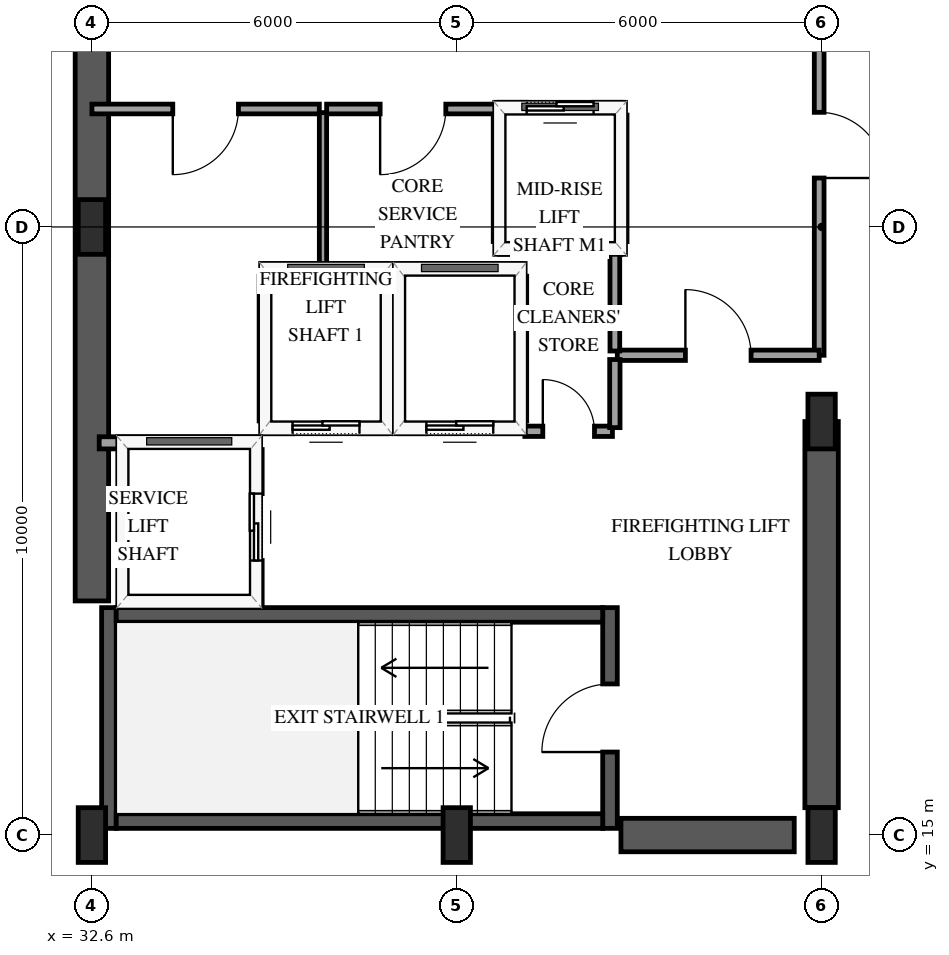
"""IFC4 building model, lengths in metres.
Left out: names, types, materials, properties, quantities, classifications, styles, units other than length and angle.
Written with IfcOpenShell. Run it as: python <this file> out.ifc"""

import sys

from ifc_helpers import new_model, si_unit, direction, frame, frame_2d, origin, origin_2d, place, context, subcontext, project, spatial, rectangle, extrude, element, fill, save


model = new_model("IFC4")
c1 = context("Model", 3, precision=1e-05, world=origin(), true_north=direction((0.0, 1.0)))
c2 = subcontext(c1, "Body", "Model", "MODEL_VIEW")
j1 = project(units=[si_unit("LENGTHUNIT", "METRE"), si_unit("PLANEANGLEUNIT", "RADIAN")], contexts=[c1])
p1 = place(None, origin())
s1 = spatial("IfcSite", under=j1, at=p1, CompositionType="ELEMENT")
p2 = place(p1, origin())
s2 = spatial("IfcBuilding", under=s1, at=p2, CompositionType="ELEMENT")
p3 = place(p2, frame((0.0, 0.0, 171.4)))
s3 = spatial("IfcBuildingStorey", under=s2, at=p3, CompositionType="ELEMENT", Elevation=171.4)
p4 = place(p3, frame((32.88, 15.11, 0.0), z_axis=(0.0, 0.0, 1.0), x_axis=(0.0, 1.0, 0.0)))
e1 = element("IfcWall", 1, at=p4, inside=s3, PredefinedType="SHEAR", context=c2, shape_type="SweptSolid", body=[
    extrude(rectangle(XDim=3.63, YDim=0.24, at=frame_2d((1.815, 0.0))), origin(), (0.0, 0.0, 1.0), 3.6),
])
p5 = place(p3, frame((41.12, 15.11, 0.0), z_axis=(0.0, 0.0, 1.0), x_axis=(0.0, 1.0, 0.0)))
e2 = element("IfcWall", 2, at=p5, inside=s3, PredefinedType="SHEAR", context=c2, shape_type="SweptSolid", body=[
    extrude(rectangle(XDim=3.63, YDim=0.24, at=frame_2d((1.815, 0.0))), origin(), (0.0, 0.0, 1.0), 3.6),
])
p6 = place(p5, frame((1.255, 0.0, 0.0)))
e3 = element("IfcOpeningElement", 3, at=p6, cuts=e2, PredefinedType="OPENING", context=c2, shape_type="SweptSolid", body=[
    extrude(rectangle(XDim=1.12, YDim=2.15, at=frame_2d((0.56, 1.075))), frame((0.0, 0.13, 0.0), z_axis=(0.0, -1.0, 0.0), x_axis=(1.0, 0.0, 0.0)), (0.0, 0.0, 1.0), 0.26),
])
for number, where, z_axis, x_axis in (
    (4, (33.0, 15.23, 0.0), (0.0, 0.0, 1.0), (1.0, 0.0, 0.0)),
    (5, (33.0, 18.62, 0.0), (0.0, 0.0, 1.0), (1.0, 0.0, 0.0)),
):
    element("IfcWall", number, at=place(p3, frame(where, z_axis=z_axis, x_axis=x_axis)), inside=s3, PredefinedType="SHEAR", context=c2, shape_type="SweptSolid", body=[
        extrude(rectangle(XDim=8.0, YDim=0.24, at=frame_2d((4.0, 0.0))), origin(), (0.0, 0.0, 1.0), 3.6),
    ])
p7 = place(p3, frame((32.6, 18.85, 0.0), z_axis=(0.0, 0.0, 1.0), x_axis=(0.0, 1.0, 0.0)))
e6 = element("IfcWall", 6, at=p7, inside=s3, PredefinedType="SHEAR", context=c2, shape_type="SweptSolid", body=[
    extrude(rectangle(XDim=12.3, YDim=0.55, at=frame_2d((6.15, 0.0))), origin(), (0.0, 0.0, 1.0), 3.6),
])
p8 = place(p3, frame((41.3, 15.0, 0.0), z_axis=(0.0, 0.0, 1.0), x_axis=(1.0, 0.0, 0.0)))
e7 = element("IfcWall", 7, at=p8, inside=s3, PredefinedType="SHEAR", context=c2, shape_type="SweptSolid", body=[
    extrude(rectangle(XDim=2.85, YDim=0.55, at=frame_2d((1.425, 0.0))), origin(), (0.0, 0.0, 1.0), 3.6),
])
p9 = place(p3, frame((44.6, 15.45, 0.0), z_axis=(0.0, 0.0, 1.0), x_axis=(0.0, 1.0, 0.0)))
e8 = element("IfcWall", 8, at=p9, inside=s3, PredefinedType="SHEAR", context=c2, shape_type="SweptSolid", body=[
    extrude(rectangle(XDim=6.35, YDim=0.55, at=frame_2d((3.175, 0.0))), origin(), (0.0, 0.0, 1.0), 3.6),
])
for number, where, z_axis, x_axis in (
    (9, (32.6, 15.0, 0.0), (0.0, 0.0, 1.0), (1.0, 0.0, 0.0)),
    (10, (32.6, 25.0, 0.0), (0.0, 0.0, 1.0), (1.0, 0.0, 0.0)),
    (11, (38.6, 15.0, 0.0), (0.0, 0.0, 1.0), (1.0, 0.0, 0.0)),
    (12, (44.6, 15.0, 0.0), (0.0, 0.0, 1.0), (1.0, 0.0, 0.0)),
    (13, (44.6, 21.8, 0.0), (0.0, 0.0, 1.0), (1.0, 0.0, 0.0)),
):
    element("IfcColumn", number, at=place(p3, frame(where, z_axis=z_axis, x_axis=x_axis)), inside=s3, PredefinedType="PILASTER", context=c2, shape_type="SweptSolid", body=[
        extrude(rectangle(XDim=0.45, YDim=0.9, at=origin_2d()), origin(), (0.0, 0.0, 1.0), 3.6),
    ])
p10 = place(p3, frame((35.45, 21.7, 0.0), z_axis=(0.0, 0.0, 1.0), x_axis=(1.0, 0.0, 0.0)))
e14 = element("IfcWall", 14, at=p10, inside=s3, PredefinedType="SOLIDWALL", context=c2, shape_type="SweptSolid", body=[
    extrude(rectangle(XDim=2.0, YDim=0.2, at=frame_2d((1.0, 0.0))), origin(), (0.0, 0.0, 1.0), 3.3),
])
p11 = place(p10, frame((0.45, 0.0, 0.0)))
e15 = element("IfcOpeningElement", 15, at=p11, cuts=e14, PredefinedType="OPENING", context=c2, shape_type="SweptSolid", body=[
    extrude(rectangle(XDim=1.1, YDim=2.15, at=frame_2d((0.55, 1.075))), frame((0.0, 0.11, 0.0), z_axis=(0.0, -1.0, 0.0), x_axis=(1.0, 0.0, 0.0)), (0.0, 0.0, 1.0), 0.22),
])
p12 = place(p3, frame((35.45, 24.3, 0.0), z_axis=(0.0, 0.0, 1.0), x_axis=(1.0, 0.0, 0.0)))
e16 = element("IfcWall", 16, at=p12, inside=s3, PredefinedType="SOLIDWALL", context=c2, shape_type="SweptSolid", body=[
    extrude(rectangle(XDim=2.0, YDim=0.2, at=frame_2d((1.0, 0.0))), origin(), (0.0, 0.0, 1.0), 3.3),
])
for number, where, z_axis, x_axis in (
    (17, (35.45, 21.81, 0.0), (0.0, 0.0, 1.0), (0.0, 1.0, 0.0)),
    (18, (37.45, 21.81, 0.0), (0.0, 0.0, 1.0), (0.0, 1.0, 0.0)),
):
    element("IfcWall", number, at=place(p3, frame(where, z_axis=z_axis, x_axis=x_axis)), inside=s3, PredefinedType="SOLIDWALL", context=c2, shape_type="SweptSolid", body=[
        extrude(rectangle(XDim=2.38, YDim=0.2, at=frame_2d((1.19, 0.0))), origin(), (0.0, 0.0, 1.0), 3.3),
    ])
p13 = place(p3, frame((37.65, 21.7, 0.0), z_axis=(0.0, 0.0, 1.0), x_axis=(1.0, 0.0, 0.0)))
e19 = element("IfcWall", 19, at=p13, inside=s3, PredefinedType="SOLIDWALL", context=c2, shape_type="SweptSolid", body=[
    extrude(rectangle(XDim=2.0, YDim=0.2, at=frame_2d((1.0, 0.0))), origin(), (0.0, 0.0, 1.0), 3.3),
])
p14 = place(p13, frame((0.45, 0.0, 0.0)))
e20 = element("IfcOpeningElement", 20, at=p14, cuts=e19, PredefinedType="OPENING", context=c2, shape_type="SweptSolid", body=[
    extrude(rectangle(XDim=1.1, YDim=2.15, at=frame_2d((0.55, 1.075))), frame((0.0, 0.11, 0.0), z_axis=(0.0, -1.0, 0.0), x_axis=(1.0, 0.0, 0.0)), (0.0, 0.0, 1.0), 0.22),
])
p15 = place(p3, frame((37.65, 24.3, 0.0), z_axis=(0.0, 0.0, 1.0), x_axis=(1.0, 0.0, 0.0)))
e21 = element("IfcWall", 21, at=p15, inside=s3, PredefinedType="SOLIDWALL", context=c2, shape_type="SweptSolid", body=[
    extrude(rectangle(XDim=2.0, YDim=0.2, at=frame_2d((1.0, 0.0))), origin(), (0.0, 0.0, 1.0), 3.3),
])
p16 = place(p3, frame((39.65, 21.81, 0.0), z_axis=(0.0, 0.0, 1.0), x_axis=(0.0, 1.0, 0.0)))
e22 = element("IfcWall", 22, at=p16, inside=s3, PredefinedType="SOLIDWALL", context=c2, shape_type="SweptSolid", body=[
    extrude(rectangle(XDim=2.38, YDim=0.2, at=frame_2d((1.19, 0.0))), origin(), (0.0, 0.0, 1.0), 3.3),
])
p17 = place(p3, frame((32.72, 21.45, 0.0), z_axis=(0.0, 0.0, 1.0), x_axis=(1.0, 0.0, 0.0)))
e23 = element("IfcWall", 23, at=p17, inside=s3, PredefinedType="SOLIDWALL", context=c2, shape_type="SweptSolid", body=[
    extrude(rectangle(XDim=2.58, YDim=0.2, at=frame_2d((1.29, 0.0))), origin(), (0.0, 0.0, 1.0), 3.3),
])
p18 = place(p3, frame((35.3, 18.79, 0.0), z_axis=(0.0, 0.0, 1.0), x_axis=(0.0, 1.0, 0.0)))
e24 = element("IfcWall", 24, at=p18, inside=s3, PredefinedType="SOLIDWALL", context=c2, shape_type="SweptSolid", body=[
    extrude(rectangle(XDim=2.55, YDim=0.2, at=frame_2d((1.275, 0.0))), origin(), (0.0, 0.0, 1.0), 3.3),
])
p19 = place(p18, frame((0.725, 0.0, 0.0)))
e25 = element("IfcOpeningElement", 25, at=p19, cuts=e24, PredefinedType="OPENING", context=c2, shape_type="SweptSolid", body=[
    extrude(rectangle(XDim=1.1, YDim=2.15, at=frame_2d((0.55, 1.075))), frame((0.0, 0.11, 0.0), z_axis=(0.0, -1.0, 0.0), x_axis=(1.0, 0.0, 0.0)), (0.0, 0.0, 1.0), 0.22),
])
p20 = place(p3, frame((39.3, 24.65, 0.0), z_axis=(0.0, 0.0, 1.0), x_axis=(1.0, 0.0, 0.0)))
e26 = element("IfcWall", 26, at=p20, inside=s3, PredefinedType="SOLIDWALL", context=c2, shape_type="SweptSolid", body=[
    extrude(rectangle(XDim=2.0, YDim=0.2, at=frame_2d((1.0, 0.0))), origin(), (0.0, 0.0, 1.0), 3.3),
])
p21 = place(p3, frame((39.3, 26.95, 0.0), z_axis=(0.0, 0.0, 1.0), x_axis=(1.0, 0.0, 0.0)))
e27 = element("IfcWall", 27, at=p21, inside=s3, PredefinedType="SOLIDWALL", context=c2, shape_type="SweptSolid", body=[
    extrude(rectangle(XDim=2.0, YDim=0.2, at=frame_2d((1.0, 0.0))), origin(), (0.0, 0.0, 1.0), 3.3),
])
p22 = place(p21, frame((0.45, 0.0, 0.0)))
e28 = element("IfcOpeningElement", 28, at=p22, cuts=e27, PredefinedType="OPENING", context=c2, shape_type="SweptSolid", body=[
    extrude(rectangle(XDim=1.1, YDim=2.15, at=frame_2d((0.55, 1.075))), frame((0.0, 0.11, 0.0), z_axis=(0.0, -1.0, 0.0), x_axis=(1.0, 0.0, 0.0)), (0.0, 0.0, 1.0), 0.22),
])
for number, where, z_axis, x_axis in (
    (29, (39.3, 24.76, 0.0), (0.0, 0.0, 1.0), (0.0, 1.0, 0.0)),
    (30, (41.3, 24.76, 0.0), (0.0, 0.0, 1.0), (0.0, 1.0, 0.0)),
):
    element("IfcWall", number, at=place(p3, frame(where, z_axis=z_axis, x_axis=x_axis)), inside=s3, PredefinedType="SOLIDWALL", context=c2, shape_type="SweptSolid", body=[
        extrude(rectangle(XDim=2.08, YDim=0.2, at=frame_2d((1.04, 0.0))), origin(), (0.0, 0.0, 1.0), 3.3),
    ])
p23 = place(p3, frame((44.56, 29.8, 0.0), z_axis=(0.0, 0.0, 1.0), x_axis=(0.0, -1.0, 0.0)))
e31 = element("IfcWall", 31, at=p23, inside=s3, PredefinedType="PARTITIONING", context=c2, shape_type="SweptSolid", body=[
    extrude(rectangle(XDim=6.91, YDim=0.16, at=frame_2d((3.455, 0.0))), origin(), (0.0, 0.0, 1.0), 2.34),
])
p24 = place(p23, frame((2.915, 0.0, 0.0)))
e32 = element("IfcOpeningElement", 32, at=p24, cuts=e31, PredefinedType="OPENING", context=c2, shape_type="SweptSolid", body=[
    extrude(rectangle(XDim=1.08, YDim=2.15, at=frame_2d((0.54, 1.075))), frame((0.0, 0.09, 0.0), z_axis=(0.0, -1.0, 0.0), x_axis=(1.0, 0.0, 0.0)), (0.0, 0.0, 1.0), 0.18),
])
p25 = place(p3, frame((36.34, 26.94, 0.0), z_axis=(0.0, 0.0, 1.0), x_axis=(-1.0, 0.0, 0.0)))
e33 = element("IfcWall", 33, at=p25, inside=s3, PredefinedType="PARTITIONING", context=c2, shape_type="SweptSolid", body=[
    extrude(rectangle(XDim=3.74, YDim=0.16, at=frame_2d((1.87, 0.0))), origin(), (0.0, 0.0, 1.0), 3.3),
])
p26 = place(p25, frame((1.33, 0.0, 0.0)))
e34 = element("IfcOpeningElement", 34, at=p26, cuts=e33, PredefinedType="OPENING", context=c2, shape_type="SweptSolid", body=[
    extrude(rectangle(XDim=1.08, YDim=2.15, at=frame_2d((0.54, 1.075))), frame((0.0, 0.09, 0.0), z_axis=(0.0, -1.0, 0.0), x_axis=(1.0, 0.0, 0.0)), (0.0, 0.0, 1.0), 0.18),
])
p27 = place(p3, frame((41.24, 22.89, 0.0), z_axis=(0.0, 0.0, 1.0), x_axis=(1.0, 0.0, 0.0)))
e35 = element("IfcWall", 35, at=p27, inside=s3, PredefinedType="PARTITIONING", context=c2, shape_type="SweptSolid", body=[
    extrude(rectangle(XDim=3.32, YDim=0.17, at=frame_2d((1.66, 0.0))), origin(), (0.0, 0.0, 1.0), 3.3),
])
p28 = place(p27, frame((1.12, 0.0, 0.0)))
e36 = element("IfcOpeningElement", 36, at=p28, cuts=e35, PredefinedType="OPENING", context=c2, shape_type="SweptSolid", body=[
    extrude(rectangle(XDim=1.08, YDim=2.15, at=frame_2d((0.54, 1.075))), frame((0.0, 0.095, 0.0), z_axis=(0.0, -1.0, 0.0), x_axis=(1.0, 0.0, 0.0)), (0.0, 0.0, 1.0), 0.19),
])
p29 = place(p3, frame((39.3, 26.94, 0.0), z_axis=(0.0, 0.0, 1.0), x_axis=(-1.0, 0.0, 0.0)))
e37 = element("IfcWall", 37, at=p29, inside=s3, PredefinedType="PARTITIONING", context=c2, shape_type="SweptSolid", body=[
    extrude(rectangle(XDim=2.84, YDim=0.16, at=frame_2d((1.42, 0.0))), origin(), (0.0, 0.0, 1.0), 3.3),
])
p30 = place(p29, frame((0.88, 0.0, 0.0)))
e38 = element("IfcOpeningElement", 38, at=p30, cuts=e37, PredefinedType="OPENING", context=c2, shape_type="SweptSolid", body=[
    extrude(rectangle(XDim=1.08, YDim=2.15, at=frame_2d((0.54, 1.075))), frame((0.0, 0.09, 0.0), z_axis=(0.0, -1.0, 0.0), x_axis=(1.0, 0.0, 0.0)), (0.0, 0.0, 1.0), 0.18),
])
p31 = place(p3, frame((36.4, 26.88, 0.0), z_axis=(0.0, 0.0, 1.0), x_axis=(0.0, -1.0, 0.0)))
e39 = element("IfcWall", 39, at=p31, inside=s3, PredefinedType="PARTITIONING", context=c2, shape_type="SweptSolid", body=[
    extrude(rectangle(XDim=2.58, YDim=0.12, at=frame_2d((1.29, 0.0))), origin(), (0.0, 0.0, 1.0), 3.3),
])
p32 = place(p3, frame((41.2, 22.96, 0.0), z_axis=(0.0, 0.0, 1.0), x_axis=(0.0, 1.0, 0.0)))
e40 = element("IfcWall", 40, at=p32, inside=s3, PredefinedType="PARTITIONING", context=c2, shape_type="SweptSolid", body=[
    extrude(rectangle(XDim=1.69, YDim=0.16, at=frame_2d((0.845, 0.0))), origin(), (0.0, 0.0, 1.0), 3.3),
])
p33 = place(p3, frame((39.72, 21.64, 0.0), z_axis=(0.0, 0.0, 1.0), x_axis=(1.0, 0.0, 0.0)))
e41 = element("IfcWall", 41, at=p33, inside=s3, PredefinedType="PARTITIONING", context=c2, shape_type="SweptSolid", body=[
    extrude(rectangle(XDim=1.44, YDim=0.17, at=frame_2d((0.72, 0.0))), origin(), (0.0, 0.0, 1.0), 3.3),
])
p34 = place(p33, frame((0.295, 0.0, 0.0)))
e42 = element("IfcOpeningElement", 42, at=p34, cuts=e41, PredefinedType="OPENING", context=c2, shape_type="SweptSolid", body=[
    extrude(rectangle(XDim=0.85, YDim=2.1, at=frame_2d((0.425, 1.05))), frame((0.0, 0.095, 0.0), z_axis=(0.0, -1.0, 0.0), x_axis=(1.0, 0.0, 0.0)), (0.0, 0.0, 1.0), 0.19),
])
p35 = place(p3, frame((41.2, 21.7, 0.0), z_axis=(0.0, 0.0, 1.0), x_axis=(0.0, 1.0, 0.0)))
e43 = element("IfcWall", 43, at=p35, inside=s3, PredefinedType="PARTITIONING", context=c2, shape_type="SweptSolid", body=[
    extrude(rectangle(XDim=1.12, YDim=0.17, at=frame_2d((0.56, 0.0))), origin(), (0.0, 0.0, 1.0), 3.3),
])
p36 = place(p11, origin())
e44 = element("IfcDoor", 44, at=p36, inside=s3, OperationType="SLIDING_TO_LEFT", PredefinedType="DOOR", context=c2, shape_type="SweptSolid", body=[
    extrude(rectangle(XDim=1.1, YDim=2.15, at=frame_2d((0.55, 1.075))), frame((0.0, 0.025, 0.0), z_axis=(0.0, -1.0, 0.0), x_axis=(1.0, 0.0, 0.0)), (0.0, 0.0, 1.0), 0.05),
])
fill(e15, e44)
p37 = place(p14, origin())
e45 = element("IfcDoor", 45, at=p37, inside=s3, OperationType="SLIDING_TO_LEFT", PredefinedType="DOOR", context=c2, shape_type="SweptSolid", body=[
    extrude(rectangle(XDim=1.1, YDim=2.15, at=frame_2d((0.55, 1.075))), frame((0.0, 0.025, 0.0), z_axis=(0.0, -1.0, 0.0), x_axis=(1.0, 0.0, 0.0)), (0.0, 0.0, 1.0), 0.05),
])
fill(e20, e45)
p38 = place(p19, origin())
e46 = element("IfcDoor", 46, at=p38, inside=s3, OperationType="SLIDING_TO_LEFT", PredefinedType="DOOR", context=c2, shape_type="SweptSolid", body=[
    extrude(rectangle(XDim=1.1, YDim=2.15, at=frame_2d((0.55, 1.075))), frame((0.0, 0.025, 0.0), z_axis=(0.0, -1.0, 0.0), x_axis=(1.0, 0.0, 0.0)), (0.0, 0.0, 1.0), 0.05),
])
fill(e25, e46)
p39 = place(p22, origin())
e47 = element("IfcDoor", 47, at=p39, inside=s3, OperationType="SLIDING_TO_LEFT", PredefinedType="DOOR", context=c2, shape_type="SweptSolid", body=[
    extrude(rectangle(XDim=1.1, YDim=2.15, at=frame_2d((0.55, 1.075))), frame((0.0, 0.025, 0.0), z_axis=(0.0, -1.0, 0.0), x_axis=(1.0, 0.0, 0.0)), (0.0, 0.0, 1.0), 0.05),
])
fill(e28, e47)
p40 = place(p6, origin())
e48 = element("IfcDoor", 48, at=p40, inside=s3, OperationType="SINGLE_SWING_LEFT", PredefinedType="DOOR", context=c2, shape_type="SweptSolid", body=[
    extrude(rectangle(XDim=1.12, YDim=2.15, at=frame_2d((0.56, 1.075))), frame((0.0, 0.025, 0.0), z_axis=(0.0, -1.0, 0.0), x_axis=(1.0, 0.0, 0.0)), (0.0, 0.0, 1.0), 0.05),
])
fill(e3, e48)
p41 = place(p24, origin())
e49 = element("IfcDoor", 49, at=p41, inside=s3, OperationType="SINGLE_SWING_RIGHT", PredefinedType="DOOR", context=c2, shape_type="SweptSolid", body=[
    extrude(rectangle(XDim=1.08, YDim=2.15, at=frame_2d((0.54, 1.075))), frame((0.0, 0.025, 0.0), z_axis=(0.0, -1.0, 0.0), x_axis=(1.0, 0.0, 0.0)), (0.0, 0.0, 1.0), 0.05),
])
fill(e32, e49)
p42 = place(p26, origin())
e50 = element("IfcDoor", 50, at=p42, inside=s3, OperationType="SINGLE_SWING_RIGHT", PredefinedType="DOOR", context=c2, shape_type="SweptSolid", body=[
    extrude(rectangle(XDim=1.08, YDim=2.15, at=frame_2d((0.54, 1.075))), frame((0.0, 0.025, 0.0), z_axis=(0.0, -1.0, 0.0), x_axis=(1.0, 0.0, 0.0)), (0.0, 0.0, 1.0), 0.05),
])
fill(e34, e50)
p43 = place(p28, origin())
e51 = element("IfcDoor", 51, at=p43, inside=s3, OperationType="SINGLE_SWING_LEFT", PredefinedType="DOOR", context=c2, shape_type="SweptSolid", body=[
    extrude(rectangle(XDim=1.08, YDim=2.15, at=frame_2d((0.54, 1.075))), frame((0.0, 0.025, 0.0), z_axis=(0.0, -1.0, 0.0), x_axis=(1.0, 0.0, 0.0)), (0.0, 0.0, 1.0), 0.05),
])
fill(e36, e51)
p44 = place(p30, origin())
e52 = element("IfcDoor", 52, at=p44, inside=s3, OperationType="SINGLE_SWING_RIGHT", PredefinedType="DOOR", context=c2, shape_type="SweptSolid", body=[
    extrude(rectangle(XDim=1.08, YDim=2.15, at=frame_2d((0.54, 1.075))), frame((0.0, 0.025, 0.0), z_axis=(0.0, -1.0, 0.0), x_axis=(1.0, 0.0, 0.0)), (0.0, 0.0, 1.0), 0.05),
])
fill(e38, e52)
p45 = place(p34, origin())
e53 = element("IfcDoor", 53, at=p45, inside=s3, OperationType="SINGLE_SWING_LEFT", PredefinedType="DOOR", context=c2, shape_type="SweptSolid", body=[
    extrude(rectangle(XDim=0.85, YDim=2.1, at=frame_2d((0.425, 1.05))), frame((0.0, 0.025, 0.0), z_axis=(0.0, -1.0, 0.0), x_axis=(1.0, 0.0, 0.0)), (0.0, 0.0, 1.0), 0.05),
])
fill(e42, e53)
save(model, sys.argv[1])
